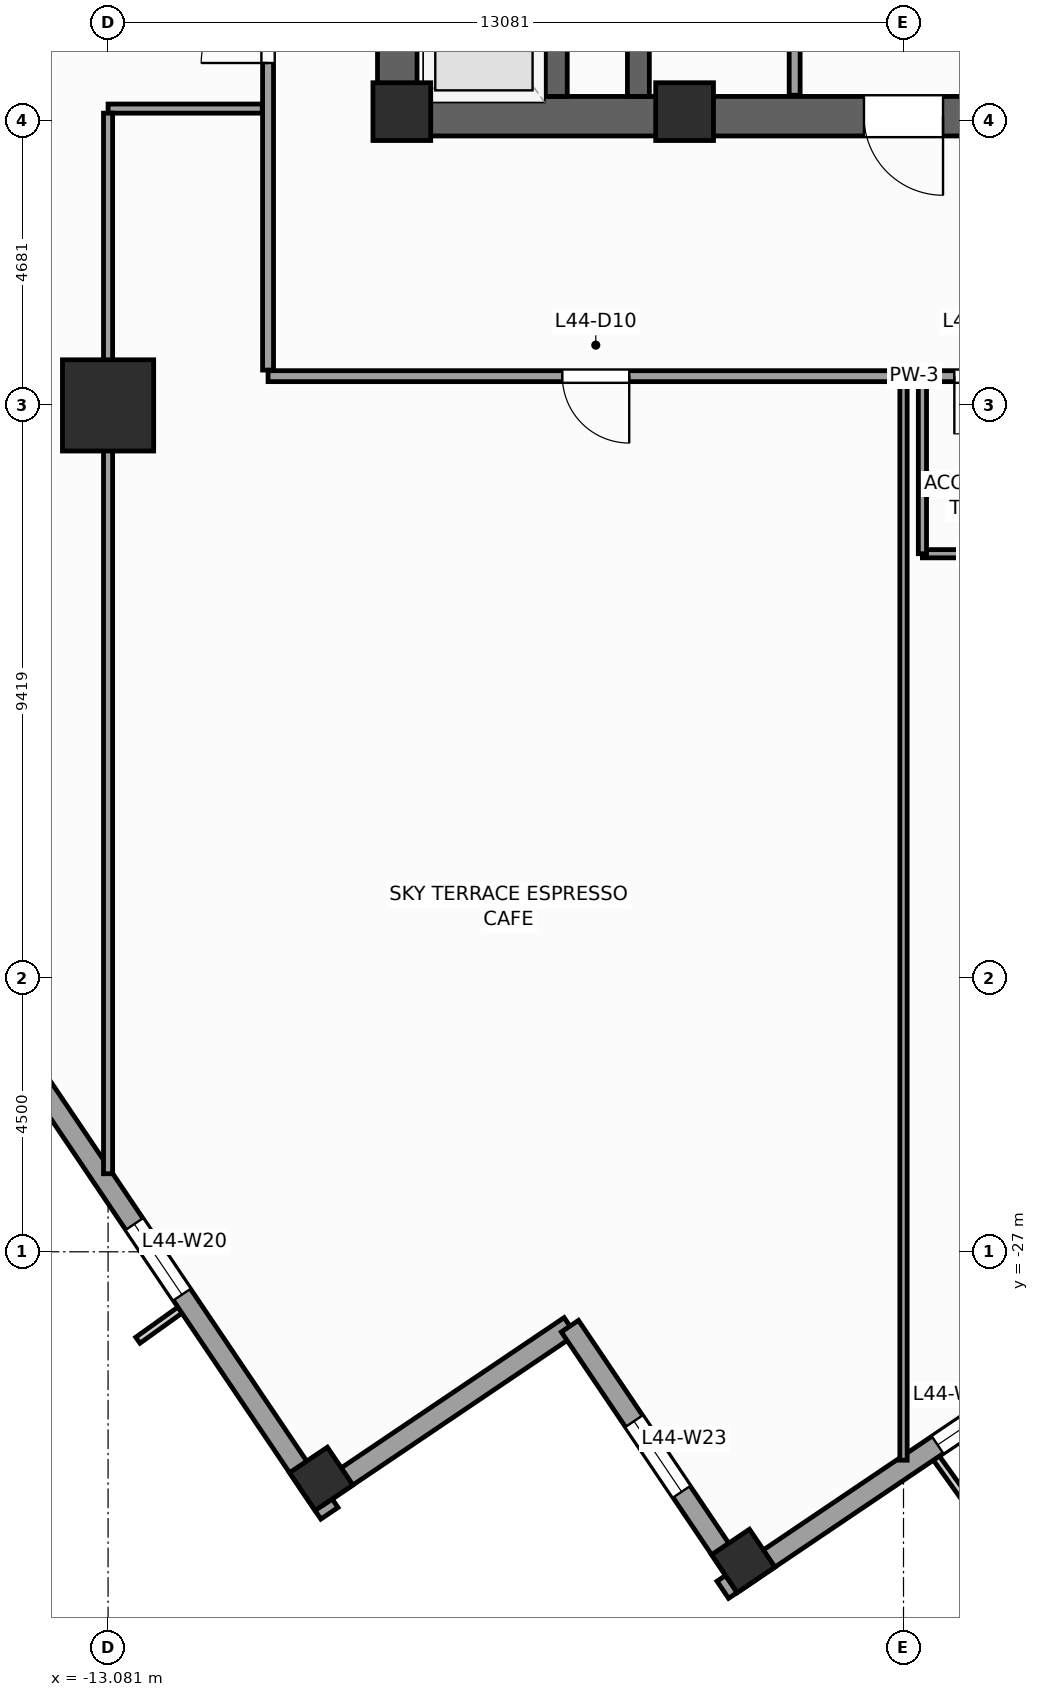
"""IFC4 building model, lengths in metres.
Left out: names, types, materials, properties, quantities, classifications, styles, units other than length and angle.
Written with IfcOpenShell. Run it as: python <this file> out.ifc"""

import sys

from ifc_helpers import new_model, si_unit, direction, frame, frame_2d, origin, origin_2d, place, context, subcontext, project, spatial, rectangle, extrude, source, transform, mapped, element, fill, save


model = new_model("IFC4")
c1 = context("Model", 3, precision=1e-05, world=origin(), true_north=direction((0.0, 1.0)))
c2 = subcontext(c1, "Body", "Model", "MODEL_VIEW")
j1 = project(units=[si_unit("LENGTHUNIT", "METRE"), si_unit("PLANEANGLEUNIT", "RADIAN")], contexts=[c1])
p1 = place(None, origin())
s1 = spatial("IfcSite", under=j1, at=p1, CompositionType="ELEMENT")
p2 = place(p1, origin())
s2 = spatial("IfcBuilding", under=s1, at=p2, CompositionType="ELEMENT")
p3 = place(p2, frame((0.0, 0.0, 184.4)))
s3 = spatial("IfcBuildingStorey", under=s2, at=p3, CompositionType="ELEMENT", Elevation=184.4)
p4 = place(p3, frame((-8.65, -8.325, 0.0), z_axis=(0.0, 0.0, 1.0), x_axis=(1.0, 0.0, 0.0)))
e1 = element("IfcWall", 1, at=p4, inside=s3, PredefinedType="SHEAR", context=c2, shape_type="SweptSolid", body=[
    extrude(rectangle(XDim=17.3, YDim=0.65, at=frame_2d((8.65, 0.0))), origin(), (0.0, 0.0, 1.0), 4.0),
])
p5 = place(p4, frame((8.0, 0.0, 0.0)))
e2 = element("IfcOpeningElement", 2, at=p5, cuts=e1, PredefinedType="OPENING", context=c2, shape_type="SweptSolid", body=[
    extrude(rectangle(XDim=1.3, YDim=2.2, at=frame_2d((0.65, 1.1))), frame((0.0, 0.335, 0.0), z_axis=(0.0, -1.0, 0.0), x_axis=(1.0, 0.0, 0.0)), (0.0, 0.0, 1.0), 0.67),
])
p6 = place(p3, frame((-8.325, -8.0, 0.0), z_axis=(0.0, 0.0, 1.0), x_axis=(0.0, 1.0, 0.0)))
e3 = element("IfcWall", 3, at=p6, inside=s3, PredefinedType="SHEAR", context=c2, shape_type="SweptSolid", body=[
    extrude(rectangle(XDim=16.0, YDim=0.65, at=frame_2d((8.0, 0.0))), origin(), (0.0, 0.0, 1.0), 4.0),
])
p7 = place(p6, frame((4.69, 0.0, 0.0)))
e4 = element("IfcOpeningElement", 4, at=p7, cuts=e3, PredefinedType="OPENING", context=c2, shape_type="SweptSolid", body=[
    extrude(rectangle(XDim=1.3, YDim=2.2, at=frame_2d((0.65, 1.1))), frame((0.0, 0.335, 0.0), z_axis=(0.0, -1.0, 0.0), x_axis=(1.0, 0.0, 0.0)), (0.0, 0.0, 1.0), 0.67),
])
p8 = place(p3, frame((-4.36, -8.0, 0.0), z_axis=(0.0, 0.0, 1.0), x_axis=(0.0, 1.0, 0.0)))
e5 = element("IfcWall", 5, at=p8, inside=s3, PredefinedType="SHEAR", context=c2, shape_type="SweptSolid", body=[
    extrude(rectangle(XDim=16.0, YDim=0.36, at=frame_2d((8.0, 0.0))), origin(), (0.0, 0.0, 1.0), 4.0),
])
p9 = place(p3, frame((-5.71, -8.0, 0.0), z_axis=(0.0, 0.0, 1.0), x_axis=(0.0, 1.0, 0.0)))
e6 = element("IfcWall", 6, at=p9, inside=s3, PredefinedType="SHEAR", context=c2, shape_type="SweptSolid", body=[
    extrude(rectangle(XDim=2.54, YDim=0.36, at=frame_2d((1.27, 0.0))), origin(), (0.0, 0.0, 1.0), 4.0),
])
m1 = source(origin(), c2, "Body", "SweptSolid", [
    extrude(rectangle(XDim=0.95, YDim=0.95, at=origin_2d()), origin(), (0.0, 0.0, 1.0), 4.0),
])
for number, where, z_axis, x_axis in (
    (7, (-8.25, -8.25, 0.0), (0.0, 0.0, 1.0), (1.0, 0.0, 0.0)),
    (8, (-3.6, -8.25, 0.0), (0.0, 0.0, 1.0), (1.0, 0.0, 0.0)),
):
    element("IfcColumn", number, at=place(p3, frame(where, z_axis=z_axis, x_axis=x_axis)), inside=s3, PredefinedType="PILASTER", context=c2, shape_type="MappedRepresentation", body=[
        mapped(m1, transform((0.0, 0.0, 0.0), scale=1.0)),
    ])
m2 = source(origin(), c2, "Body", "SweptSolid", [
    extrude(rectangle(XDim=1.5, YDim=1.5, at=origin_2d()), origin(), (0.0, 0.0, 1.0), 4.0),
])
p10 = place(p3, frame((-13.081, -13.081, 0.0), z_axis=(0.0, 0.0, 1.0), x_axis=(1.0, 0.0, 0.0)))
e9 = element("IfcColumn", 9, at=p10, inside=s3, PredefinedType="COLUMN", context=c2, shape_type="MappedRepresentation", body=[
    mapped(m2, transform((0.0, 0.0, 0.0), scale=1.0)),
])
m3 = source(origin(), c2, "Body", "SweptSolid", [
    extrude(rectangle(XDim=0.75, YDim=0.75, at=origin_2d()), origin(), (0.0, 0.0, 1.0), 4.0),
])
for number, where, z_axis, x_axis in (
    (10, (-2.635, -32.083, 0.0), (0.0, 0.0, 1.0), (0.829, 0.559, 0.0)),
    (11, (-9.576, -30.734, 0.0), (0.0, 0.0, 1.0), (0.829, 0.559, 0.0)),
):
    element("IfcColumn", number, at=place(p3, frame(where, z_axis=z_axis, x_axis=x_axis)), inside=s3, PredefinedType="COLUMN", context=c2, shape_type="MappedRepresentation", body=[
        mapped(m3, transform((0.0, 0.0, 0.0), scale=1.0)),
    ])
p11 = place(p3, frame((-2.972, -32.558, 0.0), z_axis=(0.0, 0.0, 1.0), x_axis=(0.829036218961, 0.559194910251, 0.0)))
e12 = element("IfcWall", 12, at=p11, inside=s3, PredefinedType="STANDARD", context=c2, shape_type="SweptSolid", body=[
    extrude(rectangle(XDim=41.34, YDim=0.34, at=frame_2d((20.67, 0.0))), origin(), (0.0, 0.0, 1.0), 3.04),
])
p12 = place(p11, frame((25.745, 0.0, 0.0)))
e13 = element("IfcOpeningElement", 13, at=p12, cuts=e12, PredefinedType="OPENING", context=c2, shape_type="SweptSolid", body=[
    extrude(rectangle(XDim=1.05, YDim=2.25, at=frame_2d((0.525, 1.125))), frame((0.0, 0.18, 0.0), z_axis=(0.0, -1.0, 0.0), x_axis=(1.0, 0.0, 0.0)), (0.0, 0.0, 1.0), 0.36),
])
p13 = place(p11, frame((4.261, 0.0, 0.56)))
e14 = element("IfcOpeningElement", 14, at=p13, cuts=e12, PredefinedType="OPENING", context=c2, shape_type="SweptSolid", body=[
    extrude(rectangle(XDim=1.4, YDim=2.4, at=frame_2d((0.7, 1.2))), frame((0.0, 0.18, 0.0), z_axis=(0.0, -1.0, 0.0), x_axis=(1.0, 0.0, 0.0)), (0.0, 0.0, 1.0), 0.36),
])
p14 = place(p11, frame((11.064, 0.0, 0.61)))
e15 = element("IfcOpeningElement", 15, at=p14, cuts=e12, PredefinedType="OPENING", context=c2, shape_type="SweptSolid", body=[
    extrude(rectangle(XDim=1.85, YDim=2.35, at=frame_2d((0.925, 1.175))), frame((0.0, 0.18, 0.0), z_axis=(0.0, -1.0, 0.0), x_axis=(1.0, 0.0, 0.0)), (0.0, 0.0, 1.0), 0.36),
])
p15 = place(p11, frame((18.168, 0.0, 0.61)))
e16 = element("IfcOpeningElement", 16, at=p15, cuts=e12, PredefinedType="OPENING", context=c2, shape_type="SweptSolid", body=[
    extrude(rectangle(XDim=1.85, YDim=2.35, at=frame_2d((0.925, 1.175))), frame((0.0, 0.18, 0.0), z_axis=(0.0, -1.0, 0.0), x_axis=(1.0, 0.0, 0.0)), (0.0, 0.0, 1.0), 0.36),
])
p16 = place(p11, frame((27.936, 0.0, 0.61)))
e17 = element("IfcOpeningElement", 17, at=p16, cuts=e12, PredefinedType="OPENING", context=c2, shape_type="SweptSolid", body=[
    extrude(rectangle(XDim=1.85, YDim=2.35, at=frame_2d((0.925, 1.175))), frame((0.0, 0.18, 0.0), z_axis=(0.0, -1.0, 0.0), x_axis=(1.0, 0.0, 0.0)), (0.0, 0.0, 1.0), 0.36),
])
p17 = place(p11, frame((34.852, 0.0, 0.56)))
e18 = element("IfcOpeningElement", 18, at=p17, cuts=e12, PredefinedType="OPENING", context=c2, shape_type="SweptSolid", body=[
    extrude(rectangle(XDim=1.4, YDim=2.4, at=frame_2d((0.7, 1.2))), frame((0.0, 0.18, 0.0), z_axis=(0.0, -1.0, 0.0), x_axis=(1.0, 0.0, 0.0)), (0.0, 0.0, 1.0), 0.36),
])
p18 = place(p3, frame((-32.558, 2.972, 0.0), z_axis=(0.0, 0.0, 1.0), x_axis=(0.559194910251, -0.829036218961, 0.0)))
e19 = element("IfcWall", 19, at=p18, inside=s3, PredefinedType="STANDARD", context=c2, shape_type="SweptSolid", body=[
    extrude(rectangle(XDim=41.34, YDim=0.34, at=frame_2d((20.67, 0.0))), origin(), (0.0, 0.0, 1.0), 3.04),
])
p19 = place(p18, frame((4.261, 0.0, 0.56)))
e20 = element("IfcOpeningElement", 20, at=p19, cuts=e19, PredefinedType="OPENING", context=c2, shape_type="SweptSolid", body=[
    extrude(rectangle(XDim=1.4, YDim=2.4, at=frame_2d((0.7, 1.2))), frame((0.0, 0.18, 0.0), z_axis=(0.0, -1.0, 0.0), x_axis=(1.0, 0.0, 0.0)), (0.0, 0.0, 1.0), 0.36),
])
p20 = place(p18, frame((11.064, 0.0, 0.61)))
e21 = element("IfcOpeningElement", 21, at=p20, cuts=e19, PredefinedType="OPENING", context=c2, shape_type="SweptSolid", body=[
    extrude(rectangle(XDim=1.85, YDim=2.35, at=frame_2d((0.925, 1.175))), frame((0.0, 0.18, 0.0), z_axis=(0.0, -1.0, 0.0), x_axis=(1.0, 0.0, 0.0)), (0.0, 0.0, 1.0), 0.36),
])
p21 = place(p18, frame((18.168, 0.0, 0.61)))
e22 = element("IfcOpeningElement", 22, at=p21, cuts=e19, PredefinedType="OPENING", context=c2, shape_type="SweptSolid", body=[
    extrude(rectangle(XDim=1.85, YDim=2.35, at=frame_2d((0.925, 1.175))), frame((0.0, 0.18, 0.0), z_axis=(0.0, -1.0, 0.0), x_axis=(1.0, 0.0, 0.0)), (0.0, 0.0, 1.0), 0.36),
])
p22 = place(p18, frame((27.186, 0.0, 0.61)))
e23 = element("IfcOpeningElement", 23, at=p22, cuts=e19, PredefinedType="OPENING", context=c2, shape_type="SweptSolid", body=[
    extrude(rectangle(XDim=1.85, YDim=2.35, at=frame_2d((0.925, 1.175))), frame((0.0, 0.18, 0.0), z_axis=(0.0, -1.0, 0.0), x_axis=(1.0, 0.0, 0.0)), (0.0, 0.0, 1.0), 0.36),
])
p23 = place(p18, frame((35.602, 0.0, 0.56)))
e24 = element("IfcOpeningElement", 24, at=p23, cuts=e19, PredefinedType="OPENING", context=c2, shape_type="SweptSolid", body=[
    extrude(rectangle(XDim=1.4, YDim=2.4, at=frame_2d((0.7, 1.2))), frame((0.0, 0.18, 0.0), z_axis=(0.0, -1.0, 0.0), x_axis=(1.0, 0.0, 0.0)), (0.0, 0.0, 1.0), 0.36),
])
p24 = place(p3, frame((-9.631, -31.019, 0.0), z_axis=(0.0, 0.0, 1.0), x_axis=(0.829025804298, 0.559210350234, 0.0)))
e25 = element("IfcWall", 25, at=p24, inside=s3, PredefinedType="STANDARD", context=c2, shape_type="SweptSolid", body=[
    extrude(rectangle(XDim=5.0, YDim=0.34, at=frame_2d((2.5, 0.0))), origin(), (0.0, 0.0, 1.0), 3.74),
])
p25 = place(p3, frame((-5.486, -28.223, 0.0), z_axis=(0.0, 0.0, 1.0), x_axis=(0.559171107879, -0.82905227345, 0.0)))
e26 = element("IfcWall", 26, at=p25, inside=s3, PredefinedType="STANDARD", context=c2, shape_type="SweptSolid", body=[
    extrude(rectangle(XDim=5.17, YDim=0.34, at=frame_2d((2.585, 0.0))), origin(), (0.0, 0.0, 1.0), 3.04),
])
p26 = place(p25, frame((1.885, 0.0, 0.56)))
e27 = element("IfcOpeningElement", 27, at=p26, cuts=e26, PredefinedType="OPENING", context=c2, shape_type="SweptSolid", body=[
    extrude(rectangle(XDim=1.4, YDim=2.4, at=frame_2d((0.7, 1.2))), frame((0.0, 0.18, 0.0), z_axis=(0.0, -1.0, 0.0), x_axis=(1.0, 0.0, 0.0)), (0.0, 0.0, 1.0), 0.36),
])
p27 = place(p3, frame((-1.79, -7.98, 0.0), z_axis=(0.0, 0.0, 1.0), x_axis=(0.0, 1.0, 0.0)))
e28 = element("IfcWall", 28, at=p27, inside=s3, PredefinedType="PARTITIONING", context=c2, shape_type="SweptSolid", body=[
    extrude(rectangle(XDim=12.38, YDim=0.18, at=frame_2d((6.19, 0.0))), origin(), (0.0, 0.0, 1.0), 3.74),
])
p28 = place(p27, frame((4.6, 0.0, 0.0)))
e29 = element("IfcOpeningElement", 29, at=p28, cuts=e28, PredefinedType="OPENING", context=c2, shape_type="SweptSolid", body=[
    extrude(rectangle(XDim=1.1, YDim=2.2, at=frame_2d((0.55, 1.1))), frame((0.0, 0.1, 0.0), z_axis=(0.0, -1.0, 0.0), x_axis=(1.0, 0.0, 0.0)), (0.0, 0.0, 1.0), 0.2),
])
p29 = place(p27, frame((6.66, 0.0, 0.0)))
e30 = element("IfcOpeningElement", 30, at=p29, cuts=e28, PredefinedType="OPENING", context=c2, shape_type="SweptSolid", body=[
    extrude(rectangle(XDim=1.1, YDim=2.2, at=frame_2d((0.55, 1.1))), frame((0.0, 0.1, 0.0), z_axis=(0.0, -1.0, 0.0), x_axis=(1.0, 0.0, 0.0)), (0.0, 0.0, 1.0), 0.2),
])
p30 = place(p27, frame((1.4, 0.0, 0.0)))
e31 = element("IfcOpeningElement", 31, at=p30, cuts=e28, PredefinedType="OPENING", context=c2, shape_type="SweptSolid", body=[
    extrude(rectangle(XDim=1.15, YDim=2.25, at=frame_2d((0.575, 1.125))), frame((0.0, 0.1, 0.0), z_axis=(0.0, -1.0, 0.0), x_axis=(1.0, 0.0, 0.0)), (0.0, 0.0, 1.0), 0.2),
])
p31 = place(p3, frame((-10.45, -12.6, 0.0), z_axis=(0.0, 0.0, 1.0), x_axis=(1.0, 0.0, 0.0)))
e32 = element("IfcWall", 32, at=p31, inside=s3, PredefinedType="PARTITIONING", context=c2, shape_type="SweptSolid", body=[
    extrude(rectangle(XDim=22.0, YDim=0.18, at=frame_2d((11.0, 0.0))), origin(), (0.0, 0.0, 1.0), 3.74),
])
p32 = place(p31, frame((11.286, 0.0, 0.0)))
e33 = element("IfcOpeningElement", 33, at=p32, cuts=e32, PredefinedType="OPENING", context=c2, shape_type="SweptSolid", body=[
    extrude(rectangle(XDim=0.95, YDim=2.1, at=frame_2d((0.475, 1.05))), frame((0.0, 0.1, 0.0), z_axis=(0.0, -1.0, 0.0), x_axis=(1.0, 0.0, 0.0)), (0.0, 0.0, 1.0), 0.2),
])
p33 = place(p31, frame((4.839, 0.0, 0.0)))
e34 = element("IfcOpeningElement", 34, at=p33, cuts=e32, PredefinedType="OPENING", context=c2, shape_type="SweptSolid", body=[
    extrude(rectangle(XDim=1.1, YDim=2.2, at=frame_2d((0.55, 1.1))), frame((0.0, 0.1, 0.0), z_axis=(0.0, -1.0, 0.0), x_axis=(1.0, 0.0, 0.0)), (0.0, 0.0, 1.0), 0.2),
])
p34 = place(p31, frame((16.66, 0.0, 0.0)))
e35 = element("IfcOpeningElement", 35, at=p34, cuts=e32, PredefinedType="OPENING", context=c2, shape_type="SweptSolid", body=[
    extrude(rectangle(XDim=1.1, YDim=2.2, at=frame_2d((0.55, 1.1))), frame((0.0, 0.1, 0.0), z_axis=(0.0, -1.0, 0.0), x_axis=(1.0, 0.0, 0.0)), (0.0, 0.0, 1.0), 0.2),
])
p35 = place(p3, frame((-10.45, -12.5, 0.0), z_axis=(0.0, 0.0, 1.0), x_axis=(0.0, 1.0, 0.0)))
e36 = element("IfcWall", 36, at=p35, inside=s3, PredefinedType="PARTITIONING", context=c2, shape_type="SweptSolid", body=[
    extrude(rectangle(XDim=16.3, YDim=0.18, at=frame_2d((8.15, 0.0))), origin(), (0.0, 0.0, 1.0), 3.74),
])
p36 = place(p35, frame((14.26, 0.0, 0.0)))
e37 = element("IfcOpeningElement", 37, at=p36, cuts=e36, PredefinedType="OPENING", context=c2, shape_type="SweptSolid", body=[
    extrude(rectangle(XDim=1.1, YDim=2.2, at=frame_2d((0.55, 1.1))), frame((0.0, 0.1, 0.0), z_axis=(0.0, -1.0, 0.0), x_axis=(1.0, 0.0, 0.0)), (0.0, 0.0, 1.0), 0.2),
])
p37 = place(p35, frame((11.225, 0.0, 0.0)))
e38 = element("IfcOpeningElement", 38, at=p37, cuts=e36, PredefinedType="OPENING", context=c2, shape_type="SweptSolid", body=[
    extrude(rectangle(XDim=1.1, YDim=2.2, at=frame_2d((0.55, 1.1))), frame((0.0, 0.1, 0.0), z_axis=(0.0, -1.0, 0.0), x_axis=(1.0, 0.0, 0.0)), (0.0, 0.0, 1.0), 0.2),
])
p38 = place(p35, frame((7.85, 0.0, 0.0)))
e39 = element("IfcOpeningElement", 39, at=p38, cuts=e36, PredefinedType="OPENING", context=c2, shape_type="SweptSolid", body=[
    extrude(rectangle(XDim=1.1, YDim=2.2, at=frame_2d((0.55, 1.1))), frame((0.0, 0.1, 0.0), z_axis=(0.0, -1.0, 0.0), x_axis=(1.0, 0.0, 0.0)), (0.0, 0.0, 1.0), 0.2),
])
p39 = place(p35, frame((5.05, 0.0, 0.0)))
e40 = element("IfcOpeningElement", 40, at=p39, cuts=e36, PredefinedType="OPENING", context=c2, shape_type="SweptSolid", body=[
    extrude(rectangle(XDim=1.1, YDim=2.2, at=frame_2d((0.55, 1.1))), frame((0.0, 0.1, 0.0), z_axis=(0.0, -1.0, 0.0), x_axis=(1.0, 0.0, 0.0)), (0.0, 0.0, 1.0), 0.2),
])
p40 = place(p3, frame((-10.545, -8.2, 0.0), z_axis=(0.0, 0.0, 1.0), x_axis=(-1.0, 0.0, 0.0)))
e41 = element("IfcWall", 41, at=p40, inside=s3, PredefinedType="PARTITIONING", context=c2, shape_type="SweptSolid", body=[
    extrude(rectangle(XDim=2.536, YDim=0.15, at=frame_2d((1.268, 0.0))), origin(), (0.0, 0.0, 1.0), 3.74),
])
p41 = place(p3, frame((-13.081, -8.275, 0.0), z_axis=(0.0, 0.0, 1.0), x_axis=(0.0, -1.0, 0.0)))
e42 = element("IfcWall", 42, at=p41, inside=s3, PredefinedType="PARTITIONING", context=c2, shape_type="SweptSolid", body=[
    extrude(rectangle(XDim=17.441, YDim=0.15, at=frame_2d((8.721, 0.0))), origin(), (0.0, 0.0, 1.0), 2.84),
])
p42 = place(p3, frame((0.0, -30.427, 0.0), z_axis=(0.0, 0.0, 1.0), x_axis=(0.0, 1.0, 0.0)))
e43 = element("IfcWall", 43, at=p42, inside=s3, PredefinedType="PARTITIONING", context=c2, shape_type="SweptSolid", body=[
    extrude(rectangle(XDim=17.732, YDim=0.12, at=frame_2d((8.866, 0.0))), origin(), (0.0, 0.0, 1.0), 3.74),
])
p43 = place(p3, frame((0.311, -15.52, 0.0), z_axis=(0.0, 0.0, 1.0), x_axis=(1.0, 0.0, 0.0)))
e44 = element("IfcWall", 44, at=p43, inside=s3, PredefinedType="PARTITIONING", context=c2, shape_type="SweptSolid", body=[
    extrude(rectangle(XDim=2.0, YDim=0.135, at=frame_2d((1.0, 0.0))), origin(), (0.0, 0.0, 1.0), 3.74),
])
p44 = place(p3, frame((0.311, -15.52, 0.0), z_axis=(0.0, 0.0, 1.0), x_axis=(0.0, 1.0, 0.0)))
e45 = element("IfcWall", 45, at=p44, inside=s3, PredefinedType="PARTITIONING", context=c2, shape_type="SweptSolid", body=[
    extrude(rectangle(XDim=2.9, YDim=0.135, at=frame_2d((1.45, 0.0))), origin(), (0.0, 0.0, 1.0), 3.74),
])
m4 = source(origin(), c2, "Body", "SweptSolid", [
    extrude(rectangle(XDim=1.4, YDim=2.4, at=frame_2d((0.7, 1.2))), frame((0.0, 0.03, 0.0), z_axis=(0.0, -1.0, 0.0), x_axis=(1.0, 0.0, 0.0)), (0.0, 0.0, 1.0), 0.06),
])
p45 = place(p13, origin())
e46 = element("IfcWindow", 46, at=p45, inside=s3, PartitioningType="SINGLE_PANEL", PredefinedType="WINDOW", context=c2, shape_type="MappedRepresentation", body=[
    mapped(m4, transform((0.0, 0.0, 0.0), scale=1.0)),
])
fill(e14, e46)
p46 = place(p23, origin())
e47 = element("IfcWindow", 47, at=p46, inside=s3, PartitioningType="SINGLE_PANEL", PredefinedType="WINDOW", context=c2, shape_type="MappedRepresentation", body=[
    mapped(m4, transform((0.0, 0.0, 0.0), scale=1.0)),
])
fill(e24, e47)
p47 = place(p26, origin())
e48 = element("IfcWindow", 48, at=p47, inside=s3, PartitioningType="SINGLE_PANEL", PredefinedType="WINDOW", context=c2, shape_type="MappedRepresentation", body=[
    mapped(m4, transform((0.0, 0.0, 0.0), scale=1.0)),
])
fill(e27, e48)
m5 = source(origin(), c2, "Body", "SweptSolid", [
    extrude(rectangle(XDim=1.3, YDim=2.2, at=frame_2d((0.65, 1.1))), frame((0.0, 0.025, 0.0), z_axis=(0.0, -1.0, 0.0), x_axis=(1.0, 0.0, 0.0)), (0.0, 0.0, 1.0), 0.05),
])
p48 = place(p5, frame((1.3, 0.0, 0.0), z_axis=(0.0, 0.0, 1.0), x_axis=(-1.0, 0.0, 0.0)))
e49 = element("IfcDoor", 49, at=p48, inside=s3, OperationType="SINGLE_SWING_RIGHT", PredefinedType="DOOR", context=c2, shape_type="MappedRepresentation", body=[
    mapped(m5, transform((0.0, 0.0, 0.0), scale=1.0)),
])
fill(e2, e49)
m6 = source(origin(), c2, "Body", "SweptSolid", [
    extrude(rectangle(XDim=0.95, YDim=2.1, at=frame_2d((0.475, 1.05))), frame((0.0, 0.025, 0.0), z_axis=(0.0, -1.0, 0.0), x_axis=(1.0, 0.0, 0.0)), (0.0, 0.0, 1.0), 0.05),
])
p49 = place(p32, frame((0.95, 0.0, 0.0), z_axis=(0.0, 0.0, 1.0), x_axis=(-1.0, 0.0, 0.0)))
e50 = element("IfcDoor", 50, at=p49, inside=s3, OperationType="SINGLE_SWING_LEFT", PredefinedType="DOOR", context=c2, shape_type="MappedRepresentation", body=[
    mapped(m6, transform((0.0, 0.0, 0.0), scale=1.0)),
])
fill(e33, e50)
m7 = source(origin(), c2, "Body", "SweptSolid", [
    extrude(rectangle(XDim=1.1, YDim=2.2, at=frame_2d((0.55, 1.1))), frame((0.0, 0.025, 0.0), z_axis=(0.0, -1.0, 0.0), x_axis=(1.0, 0.0, 0.0)), (0.0, 0.0, 1.0), 0.05),
])
p50 = place(p39, origin())
e51 = element("IfcDoor", 51, at=p50, inside=s3, OperationType="SINGLE_SWING_LEFT", PredefinedType="DOOR", context=c2, shape_type="MappedRepresentation", body=[
    mapped(m7, transform((0.0, 0.0, 0.0), scale=1.0)),
])
fill(e40, e51)
p51 = place(p33, frame((1.1, 0.0, 0.0), z_axis=(0.0, 0.0, 1.0), x_axis=(-1.0, 0.0, 0.0)))
e52 = element("IfcDoor", 52, at=p51, inside=s3, OperationType="SINGLE_SWING_RIGHT", PredefinedType="DOOR", context=c2, shape_type="MappedRepresentation", body=[
    mapped(m7, transform((0.0, 0.0, 0.0), scale=1.0)),
])
fill(e34, e52)
save(model, sys.argv[1])
